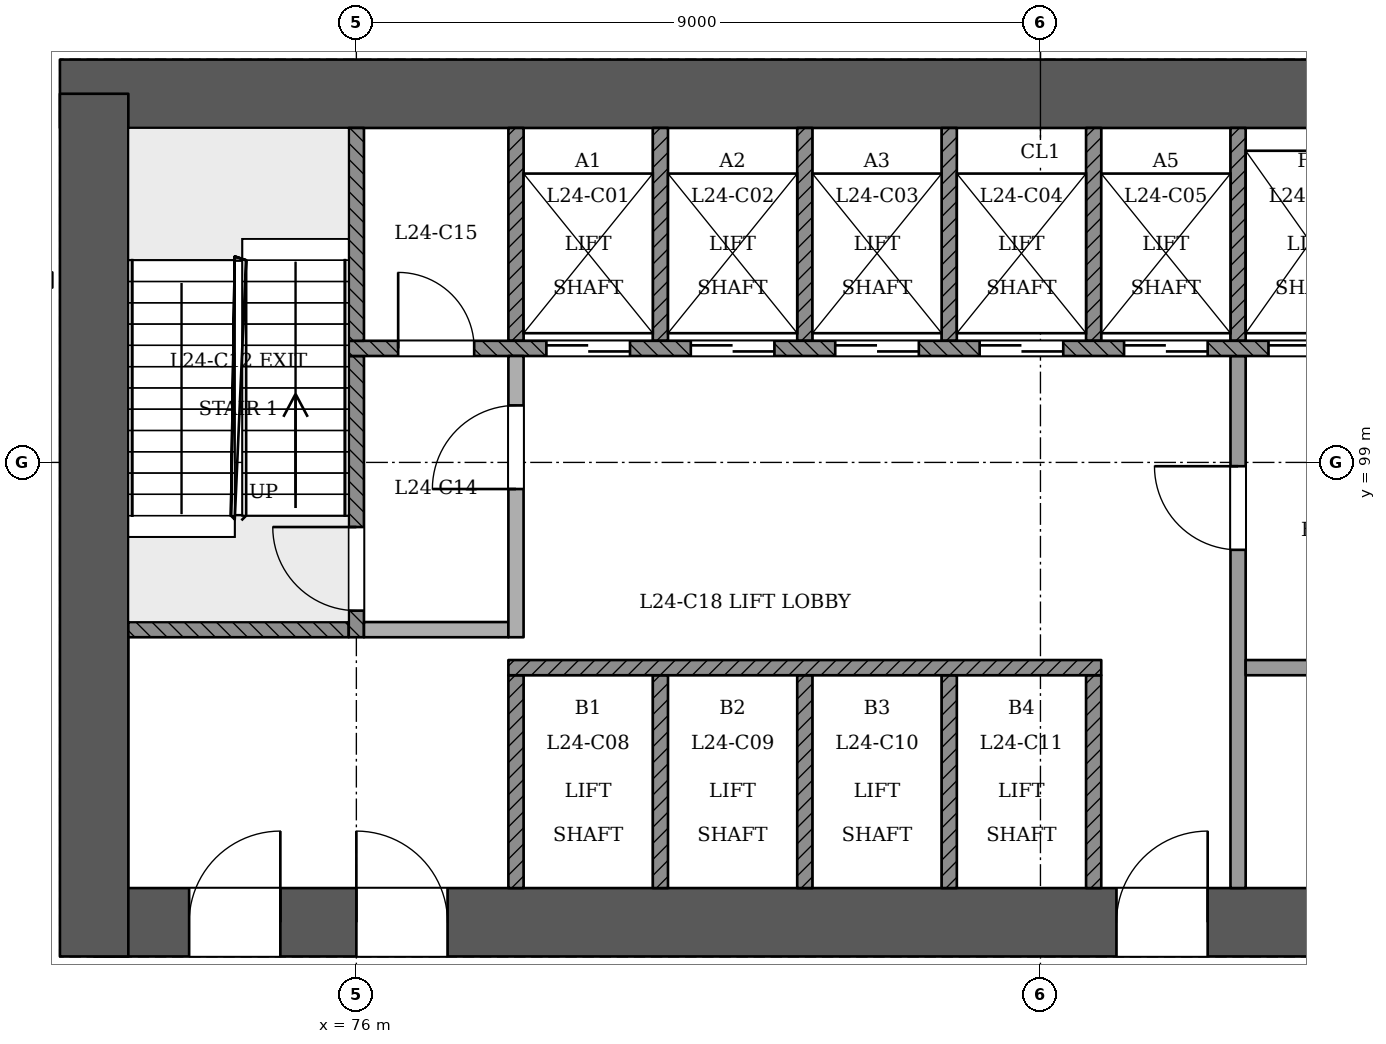
"""IFC4 building model, lengths in metres.
Left out: names, types, materials, properties, quantities, classifications, styles, units other than length and angle.
Written with IfcOpenShell. Run it as: python <this file> out.ifc"""

import sys

from ifc_helpers import new_model, si_unit, direction, frame, frame_2d, origin, place, context, subcontext, project, spatial, rectangle, extrude, element, fill, save


model = new_model("IFC4")
c1 = context("Model", 3, precision=1e-05, world=origin(), true_north=direction((0.0, 1.0)))
c2 = subcontext(c1, "Body", "Model", "MODEL_VIEW")
j1 = project(units=[si_unit("LENGTHUNIT", "METRE"), si_unit("PLANEANGLEUNIT", "RADIAN")], contexts=[c1])
p1 = place(None, origin())
s1 = spatial("IfcSite", under=j1, at=p1, CompositionType="ELEMENT")
p2 = place(p1, origin())
s2 = spatial("IfcBuilding", under=s1, at=p2, CompositionType="ELEMENT")
p3 = place(p2, frame((0.0, 0.0, 95.4)))
s3 = spatial("IfcBuildingStorey", under=s2, at=p3, CompositionType="ELEMENT", Elevation=95.4)
p4 = place(p3, frame((72.55, 92.95, 0.0), z_axis=(0.0, 0.0, 1.0), x_axis=(1.0, 0.0, 0.0)))
e1 = element("IfcWall", 1, at=p4, inside=s3, PredefinedType="SHEAR", context=c2, shape_type="SweptSolid", body=[
    extrude(rectangle(XDim=25.35, YDim=0.9, at=frame_2d((12.675, 0.0))), origin(), (0.0, 0.0, 1.0), 5.4),
])
p5 = place(p4, frame((1.25, 0.0, 0.0)))
e2 = element("IfcOpeningElement", 2, at=p5, cuts=e1, PredefinedType="OPENING", context=c2, shape_type="SweptSolid", body=[
    extrude(rectangle(XDim=1.2, YDim=2.1, at=frame_2d((0.6, 1.05))), frame((0.0, 0.46, 0.0), z_axis=(0.0, -1.0, 0.0), x_axis=(1.0, 0.0, 0.0)), (0.0, 0.0, 1.0), 0.921),
])
p6 = place(p4, frame((3.45, 0.0, 0.0)))
e3 = element("IfcOpeningElement", 3, at=p6, cuts=e1, PredefinedType="OPENING", context=c2, shape_type="SweptSolid", body=[
    extrude(rectangle(XDim=1.2, YDim=2.1, at=frame_2d((0.6, 1.05))), frame((0.0, 0.46, 0.0), z_axis=(0.0, -1.0, 0.0), x_axis=(1.0, 0.0, 0.0)), (0.0, 0.0, 1.0), 0.921),
])
p7 = place(p4, frame((13.45, 0.0, 0.0)))
e4 = element("IfcOpeningElement", 4, at=p7, cuts=e1, PredefinedType="OPENING", context=c2, shape_type="SweptSolid", body=[
    extrude(rectangle(XDim=1.2, YDim=2.1, at=frame_2d((0.6, 1.05))), frame((0.0, 0.46, 0.0), z_axis=(0.0, -1.0, 0.0), x_axis=(1.0, 0.0, 0.0)), (0.0, 0.0, 1.0), 0.921),
])
p8 = place(p4, frame((21.75, 0.0, 0.0)))
e5 = element("IfcOpeningElement", 5, at=p8, cuts=e1, PredefinedType="OPENING", context=c2, shape_type="SweptSolid", body=[
    extrude(rectangle(XDim=1.2, YDim=2.1, at=frame_2d((0.6, 1.05))), frame((0.0, 0.46, 0.0), z_axis=(0.0, -1.0, 0.0), x_axis=(1.0, 0.0, 0.0)), (0.0, 0.0, 1.0), 0.921),
])
p9 = place(p3, frame((97.45, 103.85, 0.0), z_axis=(0.0, 0.0, 1.0), x_axis=(-1.0, 0.0, 0.0)))
e6 = element("IfcWall", 6, at=p9, inside=s3, PredefinedType="SHEAR", context=c2, shape_type="SweptSolid", body=[
    extrude(rectangle(XDim=25.35, YDim=0.9, at=frame_2d((12.675, 0.0))), origin(), (0.0, 0.0, 1.0), 5.4),
])
p10 = place(p3, frame((72.55, 103.85, 0.0), z_axis=(0.0, 0.0, 1.0), x_axis=(0.0, -1.0, 0.0)))
e7 = element("IfcWall", 7, at=p10, inside=s3, PredefinedType="SHEAR", context=c2, shape_type="SweptSolid", body=[
    extrude(rectangle(XDim=11.35, YDim=0.9, at=frame_2d((5.675, 0.0))), origin(), (0.0, 0.0, 1.0), 5.4),
])
p11 = place(p3, frame((63.441, 97.606, 0.0), z_axis=(0.0, 0.0, 1.0), x_axis=(0.499997295205, -0.866026965393, 0.0)))
e8 = element("IfcWall", 8, at=p11, inside=s3, PredefinedType="PARTITIONING", context=c2, shape_type="SweptSolid", body=[
    extrude(rectangle(XDim=21.043, YDim=0.2, at=frame_2d((10.521, 0.0))), origin(), (0.0, 0.0, 1.0), 4.5),
])
p12 = place(p11, frame((5.267, 0.0, 0.0)))
e9 = element("IfcOpeningElement", 9, at=p12, cuts=e8, PredefinedType="OPENING", context=c2, shape_type="SweptSolid", body=[
    extrude(rectangle(XDim=1.2, YDim=2.4, at=frame_2d((0.6, 1.2))), frame((0.0, 0.11, 0.0), z_axis=(0.0, -1.0, 0.0), x_axis=(1.0, 0.0, 0.0)), (0.0, 0.0, 1.0), 0.221),
])
p13 = place(p11, frame((17.043, 0.0, 0.0)))
e10 = element("IfcOpeningElement", 10, at=p13, cuts=e8, PredefinedType="OPENING", context=c2, shape_type="SweptSolid", body=[
    extrude(rectangle(XDim=1.2, YDim=2.4, at=frame_2d((0.6, 1.2))), frame((0.0, 0.11, 0.0), z_axis=(0.0, -1.0, 0.0), x_axis=(1.0, 0.0, 0.0)), (0.0, 0.0, 1.0), 0.221),
])
p14 = place(p3, frame((85.516, 61.158, 0.0), z_axis=(0.0, 0.0, 1.0), x_axis=(0.499997295205, 0.866026965393, 0.0)))
e11 = element("IfcWall", 11, at=p14, inside=s3, PredefinedType="PARTITIONING", context=c2, shape_type="SweptSolid", body=[
    extrude(rectangle(XDim=42.086, YDim=0.2, at=frame_2d((21.043, 0.0))), origin(), (0.0, 0.0, 1.0), 4.5),
])
p15 = place(p14, frame((0.2, 0.0, 0.0)))
e12 = element("IfcOpeningElement", 12, at=p15, cuts=e11, PredefinedType="OPENING", context=c2, shape_type="SweptSolid", body=[
    extrude(rectangle(XDim=1.2, YDim=2.4, at=frame_2d((0.6, 1.2))), frame((0.0, 0.11, 0.0), z_axis=(0.0, -1.0, 0.0), x_axis=(1.0, 0.0, 0.0)), (0.0, 0.0, 1.0), 0.221),
])
p16 = place(p14, frame((9.193, 0.0, 0.0)))
e13 = element("IfcOpeningElement", 13, at=p16, cuts=e11, PredefinedType="OPENING", context=c2, shape_type="SweptSolid", body=[
    extrude(rectangle(XDim=1.2, YDim=2.4, at=frame_2d((0.6, 1.2))), frame((0.0, 0.11, 0.0), z_axis=(0.0, -1.0, 0.0), x_axis=(1.0, 0.0, 0.0)), (0.0, 0.0, 1.0), 0.221),
])
p17 = place(p14, frame((20.443, 0.0, 0.0)))
e14 = element("IfcOpeningElement", 14, at=p17, cuts=e11, PredefinedType="OPENING", context=c2, shape_type="SweptSolid", body=[
    extrude(rectangle(XDim=1.2, YDim=2.4, at=frame_2d((0.6, 1.2))), frame((0.0, 0.11, 0.0), z_axis=(0.0, -1.0, 0.0), x_axis=(1.0, 0.0, 0.0)), (0.0, 0.0, 1.0), 0.221),
])
p18 = place(p14, frame((29.443, 0.0, 0.0)))
e15 = element("IfcOpeningElement", 15, at=p18, cuts=e11, PredefinedType="OPENING", context=c2, shape_type="SweptSolid", body=[
    extrude(rectangle(XDim=1.2, YDim=2.4, at=frame_2d((0.6, 1.2))), frame((0.0, 0.11, 0.0), z_axis=(0.0, -1.0, 0.0), x_axis=(1.0, 0.0, 0.0)), (0.0, 0.0, 1.0), 0.221),
])
p19 = place(p14, frame((40.184, 0.0, 0.0)))
e16 = element("IfcOpeningElement", 16, at=p19, cuts=e11, PredefinedType="OPENING", context=c2, shape_type="SweptSolid", body=[
    extrude(rectangle(XDim=1.2, YDim=2.4, at=frame_2d((0.6, 1.2))), frame((0.0, 0.11, 0.0), z_axis=(0.0, -1.0, 0.0), x_axis=(1.0, 0.0, 0.0)), (0.0, 0.0, 1.0), 0.221),
])
for number, where, z_axis, x_axis in (
    (17, (78.1, 93.4, 0.0), (0.0, 0.0, 1.0), (0.0, 1.0, 0.0)),
    (18, (80.0, 93.4, 0.0), (0.0, 0.0, 1.0), (0.0, 1.0, 0.0)),
    (19, (81.9, 93.4, 0.0), (0.0, 0.0, 1.0), (0.0, 1.0, 0.0)),
    (20, (83.8, 93.4, 0.0), (0.0, 0.0, 1.0), (0.0, 1.0, 0.0)),
    (21, (85.7, 93.4, 0.0), (0.0, 0.0, 1.0), (0.0, 1.0, 0.0)),
):
    element("IfcWall", number, at=place(p3, frame(where, z_axis=z_axis, x_axis=x_axis)), inside=s3, PredefinedType="SOLIDWALL", context=c2, shape_type="SweptSolid", body=[
        extrude(rectangle(XDim=2.8, YDim=0.2, at=frame_2d((1.4, 0.0))), origin(), (0.0, 0.0, 1.0), 4.9),
    ])
p20 = place(p3, frame((87.6, 93.4, 0.0), z_axis=(0.0, 0.0, 1.0), x_axis=(0.0, 1.0, 0.0)))
e22 = element("IfcWall", 22, at=p20, inside=s3, PredefinedType="PARTITIONING", context=c2, shape_type="SweptSolid", body=[
    extrude(rectangle(XDim=7.0, YDim=0.2, at=frame_2d((3.5, 0.0))), origin(), (0.0, 0.0, 1.0), 4.9),
])
p21 = place(p20, frame((4.45, 0.0, 0.0)))
e23 = element("IfcOpeningElement", 23, at=p21, cuts=e22, PredefinedType="OPENING", context=c2, shape_type="SweptSolid", body=[
    extrude(rectangle(XDim=1.1, YDim=2.1, at=frame_2d((0.55, 1.05))), frame((0.0, 0.11, 0.0), z_axis=(0.0, -1.0, 0.0), x_axis=(1.0, 0.0, 0.0)), (0.0, 0.0, 1.0), 0.221),
])
p22 = place(p3, frame((78.0, 96.3, 0.0), z_axis=(0.0, 0.0, 1.0), x_axis=(1.0, 0.0, 0.0)))
e24 = element("IfcWall", 24, at=p22, inside=s3, PredefinedType="SOLIDWALL", context=c2, shape_type="SweptSolid", body=[
    extrude(rectangle(XDim=7.8, YDim=0.2, at=frame_2d((3.9, 0.0))), origin(), (0.0, 0.0, 1.0), 4.9),
])
p23 = place(p3, frame((87.7, 96.3, 0.0), z_axis=(0.0, 0.0, 1.0), x_axis=(1.0, 0.0, 0.0)))
e25 = element("IfcWall", 25, at=p23, inside=s3, PredefinedType="PARTITIONING", context=c2, shape_type="SweptSolid", body=[
    extrude(rectangle(XDim=3.6, YDim=0.2, at=frame_2d((1.8, 0.0))), origin(), (0.0, 0.0, 1.0), 4.9),
])
p24 = place(p3, frame((73.0, 96.8, 0.0), z_axis=(0.0, 0.0, 1.0), x_axis=(1.0, 0.0, 0.0)))
e26 = element("IfcWall", 26, at=p24, inside=s3, PredefinedType="SOLIDWALL", context=c2, shape_type="SweptSolid", body=[
    extrude(rectangle(XDim=2.9, YDim=0.2, at=frame_2d((1.45, 0.0))), origin(), (0.0, 0.0, 1.0), 4.9),
])
p25 = place(p3, frame((76.0, 96.7, 0.0), z_axis=(0.0, 0.0, 1.0), x_axis=(0.0, 1.0, 0.0)))
e27 = element("IfcWall", 27, at=p25, inside=s3, PredefinedType="SOLIDWALL", context=c2, shape_type="SweptSolid", body=[
    extrude(rectangle(XDim=3.7, YDim=0.2, at=frame_2d((1.85, 0.0))), origin(), (0.0, 0.0, 1.0), 4.9),
])
p26 = place(p25, frame((0.35, 0.0, 0.0)))
e28 = element("IfcOpeningElement", 28, at=p26, cuts=e27, PredefinedType="OPENING", context=c2, shape_type="SweptSolid", body=[
    extrude(rectangle(XDim=1.1, YDim=2.1, at=frame_2d((0.55, 1.05))), frame((0.0, 0.11, 0.0), z_axis=(0.0, -1.0, 0.0), x_axis=(1.0, 0.0, 0.0)), (0.0, 0.0, 1.0), 0.221),
])
p27 = place(p3, frame((76.1, 96.8, 0.0), z_axis=(0.0, 0.0, 1.0), x_axis=(1.0, 0.0, 0.0)))
e29 = element("IfcWall", 29, at=p27, inside=s3, PredefinedType="PARTITIONING", context=c2, shape_type="SweptSolid", body=[
    extrude(rectangle(XDim=1.9, YDim=0.2, at=frame_2d((0.95, 0.0))), origin(), (0.0, 0.0, 1.0), 4.9),
])
p28 = place(p3, frame((78.1, 96.7, 0.0), z_axis=(0.0, 0.0, 1.0), x_axis=(0.0, 1.0, 0.0)))
e30 = element("IfcWall", 30, at=p28, inside=s3, PredefinedType="PARTITIONING", context=c2, shape_type="SweptSolid", body=[
    extrude(rectangle(XDim=3.7, YDim=0.2, at=frame_2d((1.85, 0.0))), origin(), (0.0, 0.0, 1.0), 4.9),
])
p29 = place(p28, frame((1.95, 0.0, 0.0)))
e31 = element("IfcOpeningElement", 31, at=p29, cuts=e30, PredefinedType="OPENING", context=c2, shape_type="SweptSolid", body=[
    extrude(rectangle(XDim=1.1, YDim=2.1, at=frame_2d((0.55, 1.05))), frame((0.0, 0.11, 0.0), z_axis=(0.0, -1.0, 0.0), x_axis=(1.0, 0.0, 0.0)), (0.0, 0.0, 1.0), 0.221),
])
p30 = place(p3, frame((75.9, 100.5, 0.0), z_axis=(0.0, 0.0, 1.0), x_axis=(1.0, 0.0, 0.0)))
e32 = element("IfcWall", 32, at=p30, inside=s3, PredefinedType="SOLIDWALL", context=c2, shape_type="SweptSolid", body=[
    extrude(rectangle(XDim=18.2, YDim=0.2, at=frame_2d((9.1, 0.0))), origin(), (0.0, 0.0, 1.0), 4.9),
])
p31 = place(p30, frame((2.6, 0.0, 0.0)))
e33 = element("IfcOpeningElement", 33, at=p31, cuts=e32, PredefinedType="OPENING", context=c2, shape_type="SweptSolid", body=[
    extrude(rectangle(XDim=1.1, YDim=2.1, at=frame_2d((0.55, 1.05))), frame((0.0, 0.11, 0.0), z_axis=(0.0, -1.0, 0.0), x_axis=(1.0, 0.0, 0.0)), (0.0, 0.0, 1.0), 0.221),
])
p32 = place(p30, frame((4.5, 0.0, 0.0)))
e34 = element("IfcOpeningElement", 34, at=p32, cuts=e32, PredefinedType="OPENING", context=c2, shape_type="SweptSolid", body=[
    extrude(rectangle(XDim=1.1, YDim=2.1, at=frame_2d((0.55, 1.05))), frame((0.0, 0.11, 0.0), z_axis=(0.0, -1.0, 0.0), x_axis=(1.0, 0.0, 0.0)), (0.0, 0.0, 1.0), 0.221),
])
p33 = place(p30, frame((6.4, 0.0, 0.0)))
e35 = element("IfcOpeningElement", 35, at=p33, cuts=e32, PredefinedType="OPENING", context=c2, shape_type="SweptSolid", body=[
    extrude(rectangle(XDim=1.1, YDim=2.1, at=frame_2d((0.55, 1.05))), frame((0.0, 0.11, 0.0), z_axis=(0.0, -1.0, 0.0), x_axis=(1.0, 0.0, 0.0)), (0.0, 0.0, 1.0), 0.221),
])
p34 = place(p30, frame((8.3, 0.0, 0.0)))
e36 = element("IfcOpeningElement", 36, at=p34, cuts=e32, PredefinedType="OPENING", context=c2, shape_type="SweptSolid", body=[
    extrude(rectangle(XDim=1.1, YDim=2.1, at=frame_2d((0.55, 1.05))), frame((0.0, 0.11, 0.0), z_axis=(0.0, -1.0, 0.0), x_axis=(1.0, 0.0, 0.0)), (0.0, 0.0, 1.0), 0.221),
])
p35 = place(p30, frame((10.2, 0.0, 0.0)))
e37 = element("IfcOpeningElement", 37, at=p35, cuts=e32, PredefinedType="OPENING", context=c2, shape_type="SweptSolid", body=[
    extrude(rectangle(XDim=1.1, YDim=2.1, at=frame_2d((0.55, 1.05))), frame((0.0, 0.11, 0.0), z_axis=(0.0, -1.0, 0.0), x_axis=(1.0, 0.0, 0.0)), (0.0, 0.0, 1.0), 0.221),
])
p36 = place(p30, frame((12.1, 0.0, 0.0)))
e38 = element("IfcOpeningElement", 38, at=p36, cuts=e32, PredefinedType="OPENING", context=c2, shape_type="SweptSolid", body=[
    extrude(rectangle(XDim=1.1, YDim=2.1, at=frame_2d((0.55, 1.05))), frame((0.0, 0.11, 0.0), z_axis=(0.0, -1.0, 0.0), x_axis=(1.0, 0.0, 0.0)), (0.0, 0.0, 1.0), 0.221),
])
p37 = place(p30, frame((14.0, 0.0, 0.0)))
e39 = element("IfcOpeningElement", 39, at=p37, cuts=e32, PredefinedType="OPENING", context=c2, shape_type="SweptSolid", body=[
    extrude(rectangle(XDim=1.1, YDim=2.1, at=frame_2d((0.55, 1.05))), frame((0.0, 0.11, 0.0), z_axis=(0.0, -1.0, 0.0), x_axis=(1.0, 0.0, 0.0)), (0.0, 0.0, 1.0), 0.221),
])
p38 = place(p30, frame((0.65, 0.0, 0.0)))
e40 = element("IfcOpeningElement", 40, at=p38, cuts=e32, PredefinedType="OPENING", context=c2, shape_type="SweptSolid", body=[
    extrude(rectangle(XDim=1.0, YDim=2.1, at=frame_2d((0.5, 1.05))), frame((0.0, 0.11, 0.0), z_axis=(0.0, -1.0, 0.0), x_axis=(1.0, 0.0, 0.0)), (0.0, 0.0, 1.0), 0.221),
])
p39 = place(p30, frame((16.3, 0.0, 0.0)))
e41 = element("IfcOpeningElement", 41, at=p39, cuts=e32, PredefinedType="OPENING", context=c2, shape_type="SweptSolid", body=[
    extrude(rectangle(XDim=1.0, YDim=2.1, at=frame_2d((0.5, 1.05))), frame((0.0, 0.11, 0.0), z_axis=(0.0, -1.0, 0.0), x_axis=(1.0, 0.0, 0.0)), (0.0, 0.0, 1.0), 0.221),
])
for number, where, z_axis, x_axis in (
    (42, (76.0, 100.6, 0.0), (0.0, 0.0, 1.0), (0.0, 1.0, 0.0)),
    (43, (78.1, 100.6, 0.0), (0.0, 0.0, 1.0), (0.0, 1.0, 0.0)),
    (44, (80.0, 100.6, 0.0), (0.0, 0.0, 1.0), (0.0, 1.0, 0.0)),
    (45, (81.9, 100.6, 0.0), (0.0, 0.0, 1.0), (0.0, 1.0, 0.0)),
    (46, (83.8, 100.6, 0.0), (0.0, 0.0, 1.0), (0.0, 1.0, 0.0)),
    (47, (85.7, 100.6, 0.0), (0.0, 0.0, 1.0), (0.0, 1.0, 0.0)),
    (48, (87.6, 100.6, 0.0), (0.0, 0.0, 1.0), (0.0, 1.0, 0.0)),
):
    element("IfcWall", number, at=place(p3, frame(where, z_axis=z_axis, x_axis=x_axis)), inside=s3, PredefinedType="SOLIDWALL", context=c2, shape_type="SweptSolid", body=[
        extrude(rectangle(XDim=2.8, YDim=0.2, at=frame_2d((1.4, 0.0))), origin(), (0.0, 0.0, 1.0), 4.9),
    ])
p40 = place(p31, origin())
e49 = element("IfcDoor", 49, at=p40, inside=s3, OperationType="SLIDING_TO_RIGHT", PredefinedType="NOTDEFINED", context=c2, shape_type="SweptSolid", body=[
    extrude(rectangle(XDim=1.1, YDim=2.1, at=frame_2d((0.55, 1.05))), frame((0.0, 0.025, 0.0), z_axis=(0.0, -1.0, 0.0), x_axis=(1.0, 0.0, 0.0)), (0.0, 0.0, 1.0), 0.05),
])
fill(e33, e49)
p41 = place(p32, origin())
e50 = element("IfcDoor", 50, at=p41, inside=s3, OperationType="SLIDING_TO_LEFT", PredefinedType="NOTDEFINED", context=c2, shape_type="SweptSolid", body=[
    extrude(rectangle(XDim=1.1, YDim=2.1, at=frame_2d((0.55, 1.05))), frame((0.0, 0.025, 0.0), z_axis=(0.0, -1.0, 0.0), x_axis=(1.0, 0.0, 0.0)), (0.0, 0.0, 1.0), 0.05),
])
fill(e34, e50)
p42 = place(p33, origin())
e51 = element("IfcDoor", 51, at=p42, inside=s3, OperationType="SLIDING_TO_RIGHT", PredefinedType="NOTDEFINED", context=c2, shape_type="SweptSolid", body=[
    extrude(rectangle(XDim=1.1, YDim=2.1, at=frame_2d((0.55, 1.05))), frame((0.0, 0.025, 0.0), z_axis=(0.0, -1.0, 0.0), x_axis=(1.0, 0.0, 0.0)), (0.0, 0.0, 1.0), 0.05),
])
fill(e35, e51)
p43 = place(p34, origin())
e52 = element("IfcDoor", 52, at=p43, inside=s3, OperationType="SLIDING_TO_LEFT", PredefinedType="NOTDEFINED", context=c2, shape_type="SweptSolid", body=[
    extrude(rectangle(XDim=1.1, YDim=2.1, at=frame_2d((0.55, 1.05))), frame((0.0, 0.025, 0.0), z_axis=(0.0, -1.0, 0.0), x_axis=(1.0, 0.0, 0.0)), (0.0, 0.0, 1.0), 0.05),
])
fill(e36, e52)
p44 = place(p35, origin())
e53 = element("IfcDoor", 53, at=p44, inside=s3, OperationType="SLIDING_TO_RIGHT", PredefinedType="NOTDEFINED", context=c2, shape_type="SweptSolid", body=[
    extrude(rectangle(XDim=1.1, YDim=2.1, at=frame_2d((0.55, 1.05))), frame((0.0, 0.025, 0.0), z_axis=(0.0, -1.0, 0.0), x_axis=(1.0, 0.0, 0.0)), (0.0, 0.0, 1.0), 0.05),
])
fill(e37, e53)
p45 = place(p36, origin())
e54 = element("IfcDoor", 54, at=p45, inside=s3, OperationType="SLIDING_TO_RIGHT", PredefinedType="NOTDEFINED", context=c2, shape_type="SweptSolid", body=[
    extrude(rectangle(XDim=1.1, YDim=2.1, at=frame_2d((0.55, 1.05))), frame((0.0, 0.025, 0.0), z_axis=(0.0, -1.0, 0.0), x_axis=(1.0, 0.0, 0.0)), (0.0, 0.0, 1.0), 0.05),
])
fill(e38, e54)
p46 = place(p26, origin())
e55 = element("IfcDoor", 55, at=p46, inside=s3, OperationType="SINGLE_SWING_RIGHT", PredefinedType="NOTDEFINED", context=c2, shape_type="SweptSolid", body=[
    extrude(rectangle(XDim=1.1, YDim=2.1, at=frame_2d((0.55, 1.05))), frame((0.0, 0.025, 0.0), z_axis=(0.0, -1.0, 0.0), x_axis=(1.0, 0.0, 0.0)), (0.0, 0.0, 1.0), 0.05),
])
fill(e28, e55)
p47 = place(p29, origin())
e56 = element("IfcDoor", 56, at=p47, inside=s3, OperationType="SINGLE_SWING_LEFT", PredefinedType="NOTDEFINED", context=c2, shape_type="SweptSolid", body=[
    extrude(rectangle(XDim=1.1, YDim=2.1, at=frame_2d((0.55, 1.05))), frame((0.0, 0.025, 0.0), z_axis=(0.0, -1.0, 0.0), x_axis=(1.0, 0.0, 0.0)), (0.0, 0.0, 1.0), 0.05),
])
fill(e31, e56)
p48 = place(p21, origin())
e57 = element("IfcDoor", 57, at=p48, inside=s3, OperationType="SINGLE_SWING_RIGHT", PredefinedType="NOTDEFINED", context=c2, shape_type="SweptSolid", body=[
    extrude(rectangle(XDim=1.1, YDim=2.1, at=frame_2d((0.55, 1.05))), frame((0.0, 0.025, 0.0), z_axis=(0.0, -1.0, 0.0), x_axis=(1.0, 0.0, 0.0)), (0.0, 0.0, 1.0), 0.05),
])
fill(e23, e57)
p49 = place(p5, origin())
e58 = element("IfcDoor", 58, at=p49, inside=s3, OperationType="SINGLE_SWING_RIGHT", PredefinedType="NOTDEFINED", context=c2, shape_type="SweptSolid", body=[
    extrude(rectangle(XDim=1.2, YDim=2.1, at=frame_2d((0.6, 1.05))), frame((0.0, 0.025, 0.0), z_axis=(0.0, -1.0, 0.0), x_axis=(1.0, 0.0, 0.0)), (0.0, 0.0, 1.0), 0.05),
])
fill(e2, e58)
p50 = place(p6, origin())
e59 = element("IfcDoor", 59, at=p50, inside=s3, OperationType="SINGLE_SWING_LEFT", PredefinedType="NOTDEFINED", context=c2, shape_type="SweptSolid", body=[
    extrude(rectangle(XDim=1.2, YDim=2.1, at=frame_2d((0.6, 1.05))), frame((0.0, 0.025, 0.0), z_axis=(0.0, -1.0, 0.0), x_axis=(1.0, 0.0, 0.0)), (0.0, 0.0, 1.0), 0.05),
])
fill(e3, e59)
p51 = place(p7, origin())
e60 = element("IfcDoor", 60, at=p51, inside=s3, OperationType="SINGLE_SWING_RIGHT", PredefinedType="NOTDEFINED", context=c2, shape_type="SweptSolid", body=[
    extrude(rectangle(XDim=1.2, YDim=2.1, at=frame_2d((0.6, 1.05))), frame((0.0, 0.025, 0.0), z_axis=(0.0, -1.0, 0.0), x_axis=(1.0, 0.0, 0.0)), (0.0, 0.0, 1.0), 0.05),
])
fill(e4, e60)
p52 = place(p38, origin())
e61 = element("IfcDoor", 61, at=p52, inside=s3, OperationType="SINGLE_SWING_LEFT", PredefinedType="NOTDEFINED", context=c2, shape_type="SweptSolid", body=[
    extrude(rectangle(XDim=1.0, YDim=2.1, at=frame_2d((0.5, 1.05))), frame((0.0, 0.025, 0.0), z_axis=(0.0, -1.0, 0.0), x_axis=(1.0, 0.0, 0.0)), (0.0, 0.0, 1.0), 0.05),
])
fill(e40, e61)
save(model, sys.argv[1])
